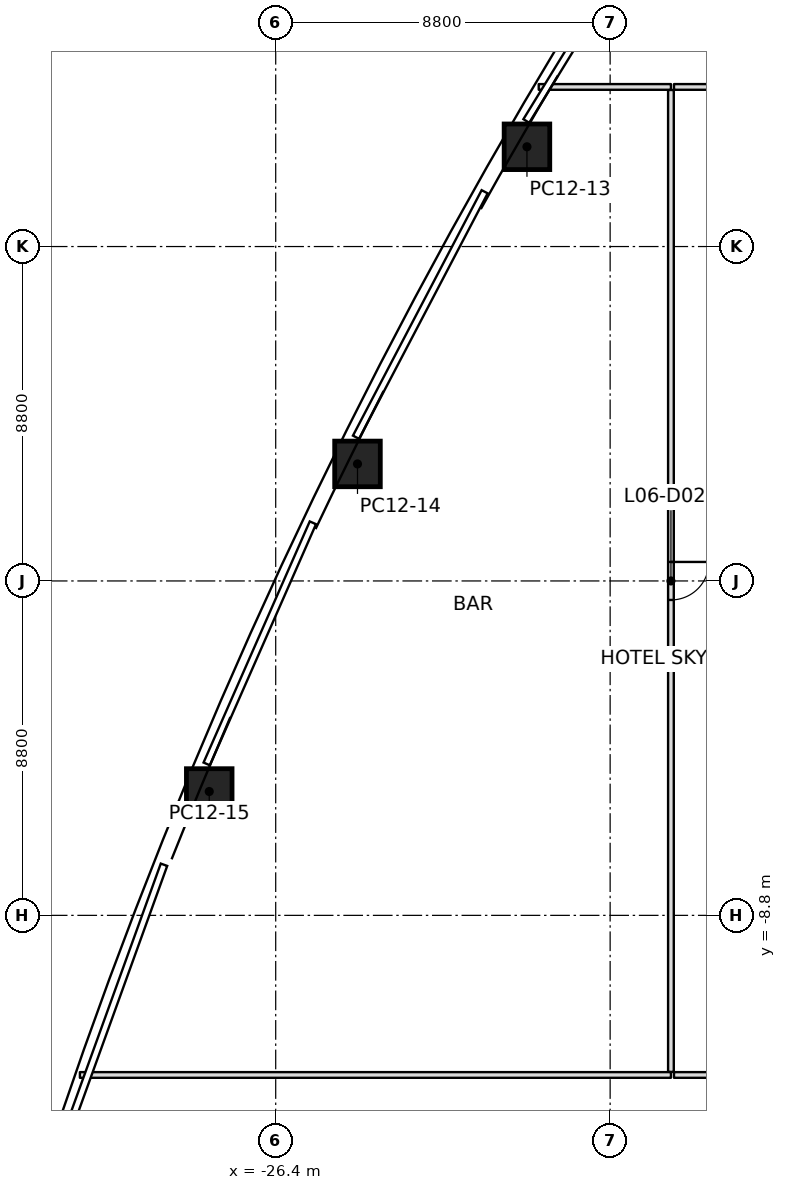
"""IFC4 building model, lengths in metres.
Left out: names, types, materials, properties, quantities, classifications, styles, units other than length and angle.
Written with IfcOpenShell. Run it as: python <this file> out.ifc"""

import sys

from ifc_helpers import new_model, si_unit, direction, frame, frame_2d, origin, origin_2d, place, context, subcontext, project, spatial, rectangle, extrude, clip, halfspace, element, fill, save


model = new_model("IFC4")
c1 = context("Model", 3, precision=1e-05, world=origin(), true_north=direction((0.0, 1.0)))
c2 = subcontext(c1, "Body", "Model", "MODEL_VIEW")
j1 = project(units=[si_unit("LENGTHUNIT", "METRE"), si_unit("PLANEANGLEUNIT", "RADIAN")], contexts=[c1])
p1 = place(None, origin())
s1 = spatial("IfcSite", under=j1, at=p1, CompositionType="ELEMENT")
p2 = place(p1, origin())
s2 = spatial("IfcBuilding", under=s1, at=p2, CompositionType="ELEMENT")
p3 = place(p2, frame((0.0, 0.0, 40.8)))
s3 = spatial("IfcBuildingStorey", under=s2, at=p3, CompositionType="ELEMENT", Elevation=40.8)
p4 = place(p3, frame((-19.789, 11.425, 0.0), z_axis=(0.005526997469, -0.003187348234, 0.999979646348), x_axis=(0.499992363016, 0.866029812948, -3.117994e-06)))
e1 = element("IfcColumn", 1, at=p4, inside=s3, PredefinedType="COLUMN", context=c2, shape_type="SweptSolid", body=[
    clip(clip(extrude(rectangle(XDim=1.2, YDim=1.2, at=origin_2d()), origin(), (0.0, 0.0, 1.0), 7.2), halfspace(frame((0.0, 0.0, 0.007)), True)), halfspace(frame((0.0, 0.0, 7.198)), False)),
])
p5 = place(p3, frame((-24.248, 3.08, 0.0), z_axis=(0.007866557869, 0.001186765196, 0.999968353927), x_axis=(0.442008886262, 0.896999173291, -0.004541759611)))
e2 = element("IfcColumn", 2, at=p5, inside=s3, PredefinedType="COLUMN", context=c2, shape_type="SweptSolid", body=[
    clip(clip(extrude(rectangle(XDim=1.2, YDim=1.2, at=origin_2d()), origin(), (0.0, 0.0, 1.0), 7.2), halfspace(frame((0.0, 0.0, 0.008)), True)), halfspace(frame((0.0, 0.0, 7.197)), False)),
])
p6 = place(p3, frame((-28.149, -5.541, 0.0), z_axis=(0.010002391004, 0.0056623705, 0.999933942685), x_axis=(0.382116007495, 0.924069998434, -0.009055098571)))
e3 = element("IfcColumn", 3, at=p6, inside=s3, PredefinedType="COLUMN", context=c2, shape_type="SweptSolid", body=[
    clip(clip(extrude(rectangle(XDim=1.2, YDim=1.2, at=origin_2d()), origin(), (0.0, 0.0, 1.0), 7.2), halfspace(frame((0.0, 0.0, 0.01)), True)), halfspace(frame((0.0, 0.0, 7.196)), False)),
])
p7 = place(p3, frame((-16.0, -13.0, 0.0), z_axis=(0.0, 0.0, 1.0), x_axis=(-1.0, 0.0, 0.0)))
e4 = element("IfcWall", 4, at=p7, inside=s3, PredefinedType="PARTITIONING", context=c2, shape_type="SweptSolid", body=[
    extrude(rectangle(XDim=15.552, YDim=0.15, at=frame_2d((7.776, 0.0))), origin(), (0.0, 0.0, 1.0), 6.297),
])
p8 = place(p3, frame((-16.0, 13.0, 0.0), z_axis=(0.0, 0.0, 1.0), x_axis=(-1.0, 0.0, 0.0)))
e5 = element("IfcWall", 5, at=p8, inside=s3, PredefinedType="PARTITIONING", context=c2, shape_type="SweptSolid", body=[
    extrude(rectangle(XDim=3.479, YDim=0.15, at=frame_2d((1.74, 0.0))), origin(), (0.0, 0.0, 1.0), 6.434),
])
p9 = place(p3, frame((-16.0, 12.92, 0.0), z_axis=(0.0, 0.0, 1.0), x_axis=(0.0, -1.0, 0.0)))
e6 = element("IfcWall", 6, at=p9, inside=s3, PredefinedType="PARTITIONING", context=c2, shape_type="SweptSolid", body=[
    extrude(rectangle(XDim=25.84, YDim=0.15, at=frame_2d((12.92, 0.0))), origin(), (0.0, 0.0, 1.0), 6.297),
])
p10 = place(p9, frame((12.42, 0.0, 0.0)))
e7 = element("IfcOpeningElement", 7, at=p10, cuts=e6, PredefinedType="OPENING", context=c2, shape_type="SweptSolid", body=[
    extrude(rectangle(XDim=1.0, YDim=2.1, at=frame_2d((0.5, 1.05))), frame((0.0, 0.075, 0.0), z_axis=(0.0, -1.0, 0.0), x_axis=(1.0, 0.0, 0.0)), (0.0, 0.0, 1.0), 0.15),
])
p11 = place(p3, frame((-15.92, -13.0, 0.0), z_axis=(0.0, 0.0, 1.0), x_axis=(1.0, 0.0, 0.0)))
e8 = element("IfcWall", 8, at=p11, inside=s3, PredefinedType="PARTITIONING", context=c2, shape_type="SweptSolid", body=[
    extrude(rectangle(XDim=31.84, YDim=0.15, at=frame_2d((15.92, 0.0))), origin(), (0.0, 0.0, 1.0), 6.447),
])
p12 = place(p11, frame((5.41, 0.0, 0.0)))
e9 = element("IfcOpeningElement", 9, at=p12, cuts=e8, PredefinedType="OPENING", context=c2, shape_type="SweptSolid", body=[
    extrude(rectangle(XDim=1.0, YDim=2.1, at=frame_2d((0.5, 1.05))), frame((0.0, 0.075, 0.0), z_axis=(0.0, -1.0, 0.0), x_axis=(1.0, 0.0, 0.0)), (0.0, 0.0, 1.0), 0.15),
])
p13 = place(p11, frame((21.43, 0.0, 0.0)))
e10 = element("IfcOpeningElement", 10, at=p13, cuts=e8, PredefinedType="OPENING", context=c2, shape_type="SweptSolid", body=[
    extrude(rectangle(XDim=1.0, YDim=2.1, at=frame_2d((0.5, 1.05))), frame((0.0, 0.075, 0.0), z_axis=(0.0, -1.0, 0.0), x_axis=(1.0, 0.0, 0.0)), (0.0, 0.0, 1.0), 0.15),
])
p14 = place(p3, frame((15.92, 13.0, 0.0), z_axis=(0.0, 0.0, 1.0), x_axis=(-1.0, 0.0, 0.0)))
e11 = element("IfcWall", 11, at=p14, inside=s3, PredefinedType="PARTITIONING", context=c2, shape_type="SweptSolid", body=[
    extrude(rectangle(XDim=31.84, YDim=0.15, at=frame_2d((15.92, 0.0))), origin(), (0.0, 0.0, 1.0), 6.297),
])
p15 = place(p14, frame((5.01, 0.0, 0.0)))
e12 = element("IfcOpeningElement", 12, at=p15, cuts=e11, PredefinedType="OPENING", context=c2, shape_type="SweptSolid", body=[
    extrude(rectangle(XDim=1.8, YDim=2.1, at=frame_2d((0.9, 1.05))), frame((0.0, 0.075, 0.0), z_axis=(0.0, -1.0, 0.0), x_axis=(1.0, 0.0, 0.0)), (0.0, 0.0, 1.0), 0.15),
])
p16 = place(p14, frame((21.23, 0.0, 0.0)))
e13 = element("IfcOpeningElement", 13, at=p16, cuts=e11, PredefinedType="OPENING", context=c2, shape_type="SweptSolid", body=[
    extrude(rectangle(XDim=1.4, YDim=2.1, at=frame_2d((0.7, 1.05))), frame((0.0, 0.075, 0.0), z_axis=(0.0, -1.0, 0.0), x_axis=(1.0, 0.0, 0.0)), (0.0, 0.0, 1.0), 0.15),
])
p17 = place(p10, origin())
e14 = element("IfcDoor", 14, at=p17, inside=s3, OperationType="SINGLE_SWING_RIGHT", PredefinedType="DOOR", context=c2, shape_type="SweptSolid", body=[
    extrude(rectangle(XDim=1.0, YDim=2.1, at=frame_2d((0.5, 1.05))), frame((0.0, 0.025, 0.0), z_axis=(0.0, -1.0, 0.0), x_axis=(1.0, 0.0, 0.0)), (0.0, 0.0, 1.0), 0.05),
])
fill(e7, e14)
save(model, sys.argv[1])
